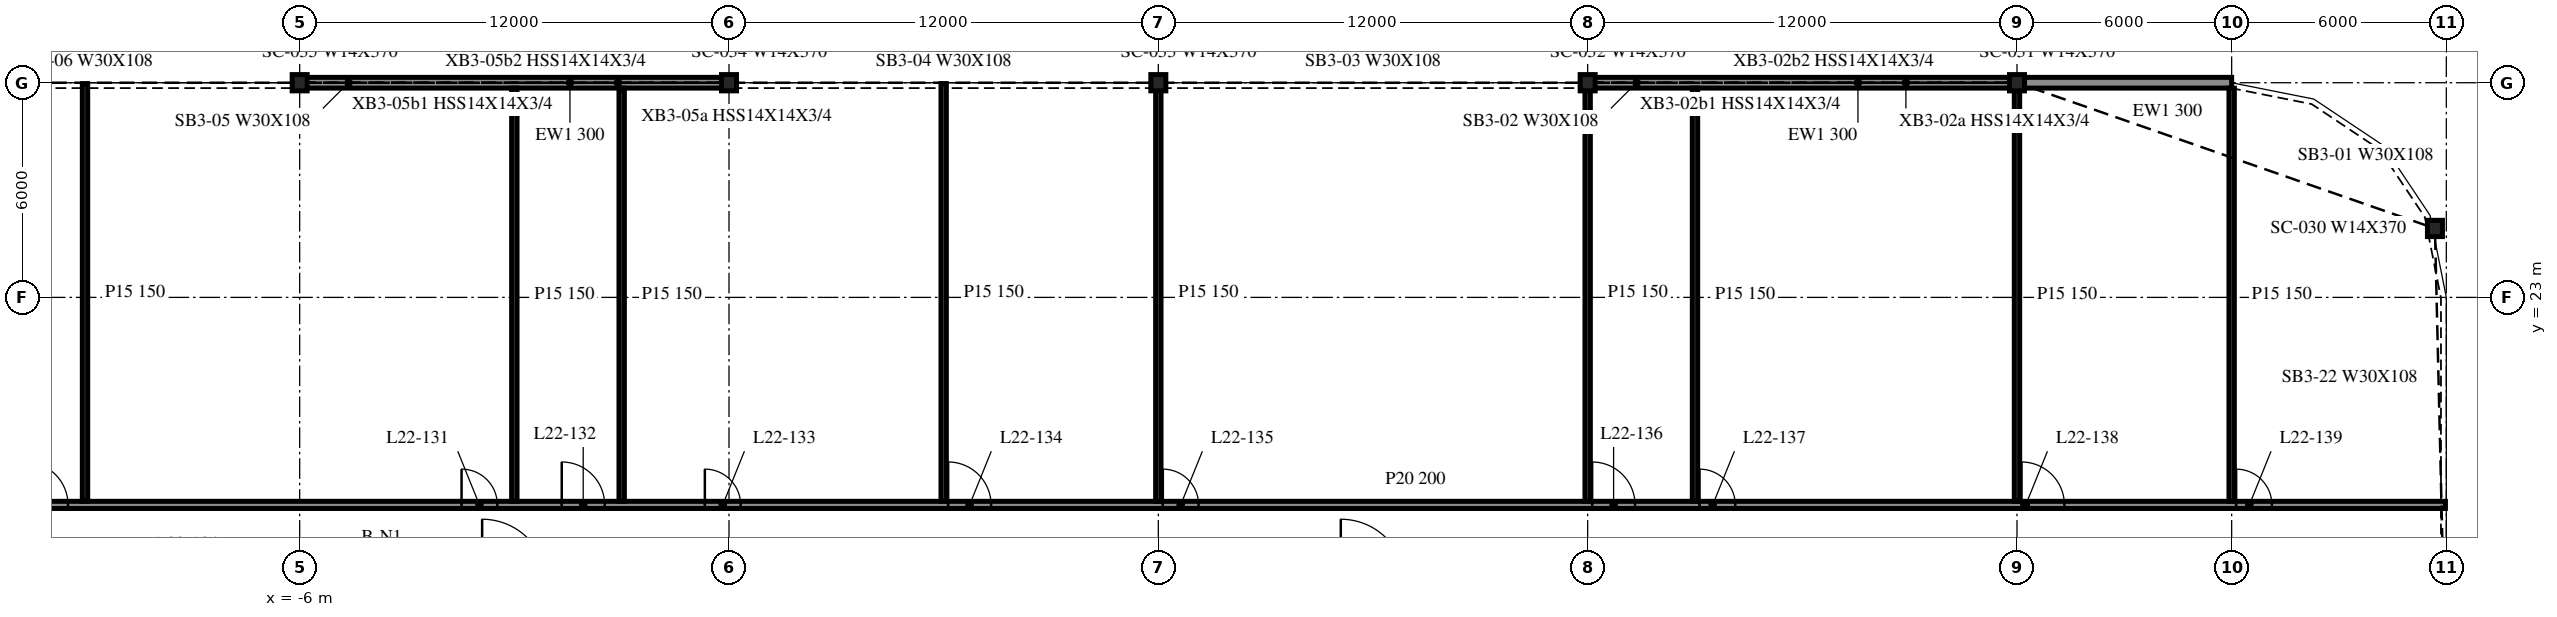
"""IFC4 building model, lengths in metres.
Left out: names, types, materials, properties, quantities, classifications, styles, units other than length and angle.
Written with IfcOpenShell. Run it as: python <this file> out.ifc"""

import sys

from ifc_helpers import new_model, si_unit, direction, frame, frame_2d, origin, origin_2d, place, context, subcontext, project, spatial, rectangle, i_section, extrude, element, fill, save


model = new_model("IFC4")
c1 = context("Model", 3, precision=1e-05, world=origin(), true_north=direction((0.0, 1.0)))
c2 = subcontext(c1, "Body", "Model", "MODEL_VIEW")
j1 = project(units=[si_unit("LENGTHUNIT", "METRE"), si_unit("PLANEANGLEUNIT", "RADIAN")], contexts=[c1])
p1 = place(None, origin())
s1 = spatial("IfcSite", under=j1, at=p1, CompositionType="ELEMENT")
p2 = place(p1, origin())
s2 = spatial("IfcBuilding", under=s1, at=p2, CompositionType="ELEMENT")
p3 = place(p2, frame((0.0, 0.0, 97.1)))
s3 = spatial("IfcBuildingStorey", under=s2, at=p3, CompositionType="ELEMENT", Elevation=97.1)
for number, where, z_axis, x_axis in (
    (1, (53.682, 24.927, -0.34), (0.0, 0.0, 1.0), (1.0, 0.0, 0.0)),
    (2, (42.0, 29.0, -0.34), (0.0, 0.0, 1.0), (1.0, 0.0, 0.0)),
    (3, (30.0, 29.0, -0.34), (0.0, 0.0, 1.0), (1.0, 0.0, 0.0)),
    (4, (18.0, 29.0, -0.34), (0.0, 0.0, 1.0), (1.0, 0.0, 0.0)),
    (5, (6.0, 29.0, -0.34), (0.0, 0.0, 1.0), (1.0, 0.0, 0.0)),
    (6, (-6.0, 29.0, -0.34), (0.0, 0.0, 1.0), (1.0, 0.0, 0.0)),
):
    element("IfcColumn", number, at=place(p3, frame(where, z_axis=z_axis, x_axis=x_axis)), inside=s3, PredefinedType="COLUMN", context=c2, shape_type="SweptSolid", body=[
        extrude(i_section(OverallWidth=0.419, OverallDepth=0.455, WebThickness=0.042, FlangeThickness=0.068, at=origin_2d()), origin(), (0.0, 0.0, 1.0), 4.1),
    ])
p4 = place(p3, frame((48.0, 29.0, 0.0), z_axis=(0.0, 0.0, 1.0), x_axis=(-1.0, 0.0, 0.0)))
e7 = element("IfcWall", 7, at=p4, inside=s3, PredefinedType="NOTDEFINED", context=c2, shape_type="SweptSolid", body=[
    extrude(rectangle(XDim=5.979, YDim=0.3, at=frame_2d((2.99, 0.0))), origin(), (0.0, 0.0, 1.0), 3.003),
])
for number, where, z_axis, x_axis in (
    (8, (41.979, 29.0, 0.0), (0.0, 0.0, 1.0), (-1.0, 0.0, 0.0)),
    (9, (5.979, 29.0, 0.0), (0.0, 0.0, 1.0), (-1.0, 0.0, 0.0)),
):
    element("IfcWall", number, at=place(p3, frame(where, z_axis=z_axis, x_axis=x_axis)), inside=s3, PredefinedType="NOTDEFINED", context=c2, shape_type="SweptSolid", body=[
        extrude(rectangle(XDim=11.958, YDim=0.3, at=frame_2d((5.979, 0.0))), origin(), (0.0, 0.0, 1.0), 3.003),
    ])
p5 = place(p3, frame((-41.975, 17.2, 0.0), z_axis=(0.0, 0.0, 1.0), x_axis=(1.0, 0.0, 0.0)))
e10 = element("IfcWall", 10, at=p5, inside=s3, PredefinedType="PARTITIONING", context=c2, shape_type="SweptSolid", body=[
    extrude(rectangle(XDim=95.95, YDim=0.2, at=frame_2d((47.975, 0.0))), origin(), (0.0, 0.0, 1.0), 3.76),
])
p6 = place(p5, frame((10.5, 0.0, 0.0)))
e11 = element("IfcOpeningElement", 11, at=p6, cuts=e10, PredefinedType="OPENING", context=c2, shape_type="SweptSolid", body=[
    extrude(rectangle(XDim=1.0, YDim=2.1, at=frame_2d((0.5, 1.05))), frame((0.0, 0.11, 0.0), z_axis=(0.0, -1.0, 0.0), x_axis=(1.0, 0.0, 0.0)), (0.0, 0.0, 1.0), 0.22),
])
p7 = place(p5, frame((13.3, 0.0, 0.0)))
e12 = element("IfcOpeningElement", 12, at=p7, cuts=e10, PredefinedType="OPENING", context=c2, shape_type="SweptSolid", body=[
    extrude(rectangle(XDim=1.2, YDim=2.1, at=frame_2d((0.6, 1.05))), frame((0.0, 0.11, 0.0), z_axis=(0.0, -1.0, 0.0), x_axis=(1.0, 0.0, 0.0)), (0.0, 0.0, 1.0), 0.22),
])
p8 = place(p5, frame((22.5, 0.0, 0.0)))
e13 = element("IfcOpeningElement", 13, at=p8, cuts=e10, PredefinedType="OPENING", context=c2, shape_type="SweptSolid", body=[
    extrude(rectangle(XDim=1.0, YDim=2.1, at=frame_2d((0.5, 1.05))), frame((0.0, 0.11, 0.0), z_axis=(0.0, -1.0, 0.0), x_axis=(1.0, 0.0, 0.0)), (0.0, 0.0, 1.0), 0.22),
])
p9 = place(p5, frame((28.3, 0.0, 0.0)))
e14 = element("IfcOpeningElement", 14, at=p9, cuts=e10, PredefinedType="OPENING", context=c2, shape_type="SweptSolid", body=[
    extrude(rectangle(XDim=1.2, YDim=2.1, at=frame_2d((0.6, 1.05))), frame((0.0, 0.11, 0.0), z_axis=(0.0, -1.0, 0.0), x_axis=(1.0, 0.0, 0.0)), (0.0, 0.0, 1.0), 0.22),
])
p10 = place(p5, frame((40.5, 0.0, 0.0)))
e15 = element("IfcOpeningElement", 15, at=p10, cuts=e10, PredefinedType="OPENING", context=c2, shape_type="SweptSolid", body=[
    extrude(rectangle(XDim=1.0, YDim=2.1, at=frame_2d((0.5, 1.05))), frame((0.0, 0.11, 0.0), z_axis=(0.0, -1.0, 0.0), x_axis=(1.0, 0.0, 0.0)), (0.0, 0.0, 1.0), 0.22),
])
p11 = place(p5, frame((43.3, 0.0, 0.0)))
e16 = element("IfcOpeningElement", 16, at=p11, cuts=e10, PredefinedType="OPENING", context=c2, shape_type="SweptSolid", body=[
    extrude(rectangle(XDim=1.2, YDim=2.1, at=frame_2d((0.6, 1.05))), frame((0.0, 0.11, 0.0), z_axis=(0.0, -1.0, 0.0), x_axis=(1.0, 0.0, 0.0)), (0.0, 0.0, 1.0), 0.22),
])
p12 = place(p5, frame((47.3, 0.0, 0.0)))
e17 = element("IfcOpeningElement", 17, at=p12, cuts=e10, PredefinedType="OPENING", context=c2, shape_type="SweptSolid", body=[
    extrude(rectangle(XDim=1.0, YDim=2.1, at=frame_2d((0.5, 1.05))), frame((0.0, 0.11, 0.0), z_axis=(0.0, -1.0, 0.0), x_axis=(1.0, 0.0, 0.0)), (0.0, 0.0, 1.0), 0.22),
])
p13 = place(p5, frame((54.1, 0.0, 0.0)))
e18 = element("IfcOpeningElement", 18, at=p13, cuts=e10, PredefinedType="OPENING", context=c2, shape_type="SweptSolid", body=[
    extrude(rectangle(XDim=1.2, YDim=2.1, at=frame_2d((0.6, 1.05))), frame((0.0, 0.11, 0.0), z_axis=(0.0, -1.0, 0.0), x_axis=(1.0, 0.0, 0.0)), (0.0, 0.0, 1.0), 0.22),
])
p14 = place(p5, frame((60.1, 0.0, 0.0)))
e19 = element("IfcOpeningElement", 19, at=p14, cuts=e10, PredefinedType="OPENING", context=c2, shape_type="SweptSolid", body=[
    extrude(rectangle(XDim=1.0, YDim=2.1, at=frame_2d((0.5, 1.05))), frame((0.0, 0.11, 0.0), z_axis=(0.0, -1.0, 0.0), x_axis=(1.0, 0.0, 0.0)), (0.0, 0.0, 1.0), 0.22),
])
p15 = place(p5, frame((72.1, 0.0, 0.0)))
e20 = element("IfcOpeningElement", 20, at=p15, cuts=e10, PredefinedType="OPENING", context=c2, shape_type="SweptSolid", body=[
    extrude(rectangle(XDim=1.2, YDim=2.1, at=frame_2d((0.6, 1.05))), frame((0.0, 0.11, 0.0), z_axis=(0.0, -1.0, 0.0), x_axis=(1.0, 0.0, 0.0)), (0.0, 0.0, 1.0), 0.22),
])
p16 = place(p5, frame((75.1, 0.0, 0.0)))
e21 = element("IfcOpeningElement", 21, at=p16, cuts=e10, PredefinedType="OPENING", context=c2, shape_type="SweptSolid", body=[
    extrude(rectangle(XDim=1.0, YDim=2.1, at=frame_2d((0.5, 1.05))), frame((0.0, 0.11, 0.0), z_axis=(0.0, -1.0, 0.0), x_axis=(1.0, 0.0, 0.0)), (0.0, 0.0, 1.0), 0.22),
])
p17 = place(p5, frame((84.1, 0.0, 0.0)))
e22 = element("IfcOpeningElement", 22, at=p17, cuts=e10, PredefinedType="OPENING", context=c2, shape_type="SweptSolid", body=[
    extrude(rectangle(XDim=1.2, YDim=2.1, at=frame_2d((0.6, 1.05))), frame((0.0, 0.11, 0.0), z_axis=(0.0, -1.0, 0.0), x_axis=(1.0, 0.0, 0.0)), (0.0, 0.0, 1.0), 0.22),
])
p18 = place(p5, frame((90.1, 0.0, 0.0)))
e23 = element("IfcOpeningElement", 23, at=p18, cuts=e10, PredefinedType="OPENING", context=c2, shape_type="SweptSolid", body=[
    extrude(rectangle(XDim=1.0, YDim=2.1, at=frame_2d((0.5, 1.05))), frame((0.0, 0.11, 0.0), z_axis=(0.0, -1.0, 0.0), x_axis=(1.0, 0.0, 0.0)), (0.0, 0.0, 1.0), 0.22),
])
p19 = place(p3, frame((-12.0, 17.3, 0.0), z_axis=(0.0, 0.0, 1.0), x_axis=(0.0, 1.0, 0.0)))
e24 = element("IfcWall", 24, at=p19, inside=s3, PredefinedType="PARTITIONING", context=c2, shape_type="SweptSolid", body=[
    extrude(rectangle(XDim=11.675, YDim=0.15, at=frame_2d((5.837, 0.0))), origin(), (0.0, 0.0, 1.0), 3.76),
])
for number, where, z_axis, x_axis in (
    (25, (0.0, 17.3, 0.0), (0.0, 0.0, 1.0), (0.0, 1.0, 0.0)),
    (26, (3.0, 17.3, 0.0), (0.0, 0.0, 1.0), (0.0, 1.0, 0.0)),
):
    element("IfcWall", number, at=place(p3, frame(where, z_axis=z_axis, x_axis=x_axis)), inside=s3, PredefinedType="PARTITIONING", context=c2, shape_type="SweptSolid", body=[
        extrude(rectangle(XDim=11.55, YDim=0.15, at=frame_2d((5.775, 0.0))), origin(), (0.0, 0.0, 1.0), 3.76),
    ])
for number, where, z_axis, x_axis in (
    (27, (12.0, 17.3, 0.0), (0.0, 0.0, 1.0), (0.0, 1.0, 0.0)),
    (28, (18.0, 17.3, 0.0), (0.0, 0.0, 1.0), (0.0, 1.0, 0.0)),
    (29, (30.0, 17.3, 0.0), (0.0, 0.0, 1.0), (0.0, 1.0, 0.0)),
):
    element("IfcWall", number, at=place(p3, frame(where, z_axis=z_axis, x_axis=x_axis)), inside=s3, PredefinedType="PARTITIONING", context=c2, shape_type="SweptSolid", body=[
        extrude(rectangle(XDim=11.675, YDim=0.15, at=frame_2d((5.837, 0.0))), origin(), (0.0, 0.0, 1.0), 3.76),
    ])
for number, where, z_axis, x_axis in (
    (30, (33.0, 17.3, 0.0), (0.0, 0.0, 1.0), (0.0, 1.0, 0.0)),
    (31, (42.0, 17.3, 0.0), (0.0, 0.0, 1.0), (0.0, 1.0, 0.0)),
):
    element("IfcWall", number, at=place(p3, frame(where, z_axis=z_axis, x_axis=x_axis)), inside=s3, PredefinedType="PARTITIONING", context=c2, shape_type="SweptSolid", body=[
        extrude(rectangle(XDim=11.55, YDim=0.15, at=frame_2d((5.775, 0.0))), origin(), (0.0, 0.0, 1.0), 3.76),
    ])
p20 = place(p3, frame((48.0, 17.3, 0.0), z_axis=(0.0, 0.0, 1.0), x_axis=(0.0, 1.0, 0.0)))
e32 = element("IfcWall", 32, at=p20, inside=s3, PredefinedType="PARTITIONING", context=c2, shape_type="SweptSolid", body=[
    extrude(rectangle(XDim=11.547, YDim=0.15, at=frame_2d((5.773, 0.0))), origin(), (0.0, 0.0, 1.0), 3.76),
])
p21 = place(p9, origin())
e33 = element("IfcDoor", 33, at=p21, inside=s3, OperationType="SINGLE_SWING_LEFT", PredefinedType="DOOR", context=c2, shape_type="SweptSolid", body=[
    extrude(rectangle(XDim=1.2, YDim=2.1, at=frame_2d((0.6, 1.05))), frame((0.0, 0.025, 0.0), z_axis=(0.0, -1.0, 0.0), x_axis=(1.0, 0.0, 0.0)), (0.0, 0.0, 1.0), 0.05),
])
fill(e14, e33)
p22 = place(p10, origin())
e34 = element("IfcDoor", 34, at=p22, inside=s3, OperationType="SINGLE_SWING_LEFT", PredefinedType="DOOR", context=c2, shape_type="SweptSolid", body=[
    extrude(rectangle(XDim=1.0, YDim=2.1, at=frame_2d((0.5, 1.05))), frame((0.0, 0.025, 0.0), z_axis=(0.0, -1.0, 0.0), x_axis=(1.0, 0.0, 0.0)), (0.0, 0.0, 1.0), 0.05),
])
fill(e15, e34)
p23 = place(p11, origin())
e35 = element("IfcDoor", 35, at=p23, inside=s3, OperationType="SINGLE_SWING_LEFT", PredefinedType="DOOR", context=c2, shape_type="SweptSolid", body=[
    extrude(rectangle(XDim=1.2, YDim=2.1, at=frame_2d((0.6, 1.05))), frame((0.0, 0.025, 0.0), z_axis=(0.0, -1.0, 0.0), x_axis=(1.0, 0.0, 0.0)), (0.0, 0.0, 1.0), 0.05),
])
fill(e16, e35)
p24 = place(p12, origin())
e36 = element("IfcDoor", 36, at=p24, inside=s3, OperationType="SINGLE_SWING_LEFT", PredefinedType="DOOR", context=c2, shape_type="SweptSolid", body=[
    extrude(rectangle(XDim=1.0, YDim=2.1, at=frame_2d((0.5, 1.05))), frame((0.0, 0.025, 0.0), z_axis=(0.0, -1.0, 0.0), x_axis=(1.0, 0.0, 0.0)), (0.0, 0.0, 1.0), 0.05),
])
fill(e17, e36)
p25 = place(p13, origin())
e37 = element("IfcDoor", 37, at=p25, inside=s3, OperationType="SINGLE_SWING_RIGHT", PredefinedType="DOOR", context=c2, shape_type="SweptSolid", body=[
    extrude(rectangle(XDim=1.2, YDim=2.1, at=frame_2d((0.6, 1.05))), frame((0.0, 0.025, 0.0), z_axis=(0.0, -1.0, 0.0), x_axis=(1.0, 0.0, 0.0)), (0.0, 0.0, 1.0), 0.05),
])
fill(e18, e37)
p26 = place(p14, origin())
e38 = element("IfcDoor", 38, at=p26, inside=s3, OperationType="SINGLE_SWING_RIGHT", PredefinedType="DOOR", context=c2, shape_type="SweptSolid", body=[
    extrude(rectangle(XDim=1.0, YDim=2.1, at=frame_2d((0.5, 1.05))), frame((0.0, 0.025, 0.0), z_axis=(0.0, -1.0, 0.0), x_axis=(1.0, 0.0, 0.0)), (0.0, 0.0, 1.0), 0.05),
])
fill(e19, e38)
p27 = place(p15, origin())
e39 = element("IfcDoor", 39, at=p27, inside=s3, OperationType="SINGLE_SWING_RIGHT", PredefinedType="DOOR", context=c2, shape_type="SweptSolid", body=[
    extrude(rectangle(XDim=1.2, YDim=2.1, at=frame_2d((0.6, 1.05))), frame((0.0, 0.025, 0.0), z_axis=(0.0, -1.0, 0.0), x_axis=(1.0, 0.0, 0.0)), (0.0, 0.0, 1.0), 0.05),
])
fill(e20, e39)
p28 = place(p16, origin())
e40 = element("IfcDoor", 40, at=p28, inside=s3, OperationType="SINGLE_SWING_RIGHT", PredefinedType="DOOR", context=c2, shape_type="SweptSolid", body=[
    extrude(rectangle(XDim=1.0, YDim=2.1, at=frame_2d((0.5, 1.05))), frame((0.0, 0.025, 0.0), z_axis=(0.0, -1.0, 0.0), x_axis=(1.0, 0.0, 0.0)), (0.0, 0.0, 1.0), 0.05),
])
fill(e21, e40)
p29 = place(p17, origin())
e41 = element("IfcDoor", 41, at=p29, inside=s3, OperationType="SINGLE_SWING_RIGHT", PredefinedType="DOOR", context=c2, shape_type="SweptSolid", body=[
    extrude(rectangle(XDim=1.2, YDim=2.1, at=frame_2d((0.6, 1.05))), frame((0.0, 0.025, 0.0), z_axis=(0.0, -1.0, 0.0), x_axis=(1.0, 0.0, 0.0)), (0.0, 0.0, 1.0), 0.05),
])
fill(e22, e41)
p30 = place(p18, origin())
e42 = element("IfcDoor", 42, at=p30, inside=s3, OperationType="SINGLE_SWING_RIGHT", PredefinedType="DOOR", context=c2, shape_type="SweptSolid", body=[
    extrude(rectangle(XDim=1.0, YDim=2.1, at=frame_2d((0.5, 1.05))), frame((0.0, 0.025, 0.0), z_axis=(0.0, -1.0, 0.0), x_axis=(1.0, 0.0, 0.0)), (0.0, 0.0, 1.0), 0.05),
])
fill(e23, e42)
save(model, sys.argv[1])
